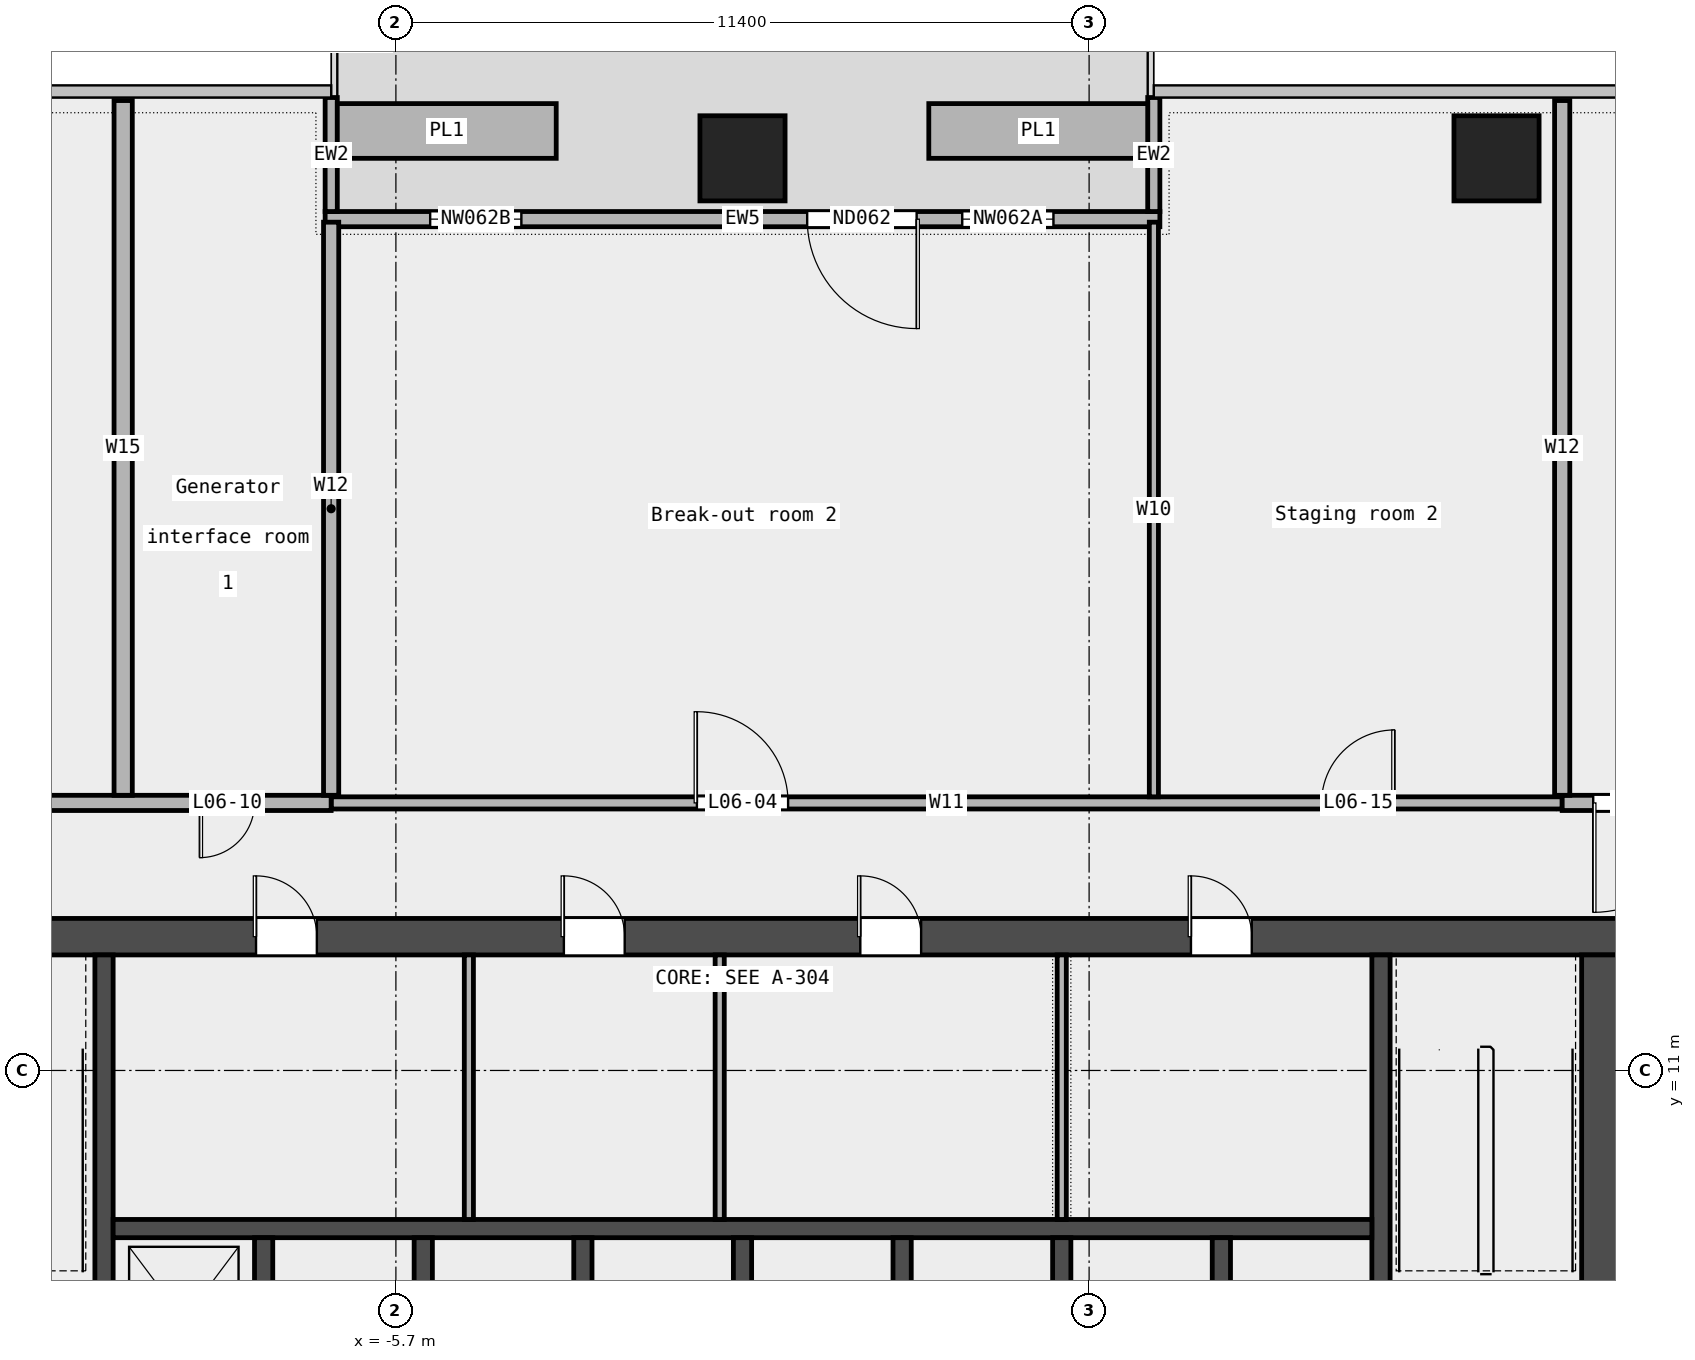
"""IFC4 building model, lengths in metres.
Left out: names, types, materials, properties, quantities, classifications, styles, units other than length and angle.
Written with IfcOpenShell. Run it as: python <this file> out.ifc"""

import sys

from ifc_helpers import new_model, si_unit, direction, frame, frame_2d, origin, origin_2d, place, context, subcontext, project, spatial, rectangle, extrude, element, fill, save


model = new_model("IFC4")
c1 = context("Model", 3, precision=1e-05, world=origin(), true_north=direction((0.0, 1.0)))
c2 = subcontext(c1, "Body", "Model", "MODEL_VIEW")
j1 = project(units=[si_unit("LENGTHUNIT", "METRE"), si_unit("PLANEANGLEUNIT", "RADIAN")], contexts=[c1])
p1 = place(None, origin())
s1 = spatial("IfcSite", under=j1, at=p1, CompositionType="ELEMENT")
p2 = place(p1, origin())
s2 = spatial("IfcBuilding", under=s1, at=p2, CompositionType="ELEMENT")
p3 = place(p2, frame((0.0, 0.0, 35.8)))
s3 = spatial("IfcBuildingStorey", under=s2, at=p3, CompositionType="ELEMENT", Elevation=35.8)
for number, where, z_axis, x_axis in (
    (1, (12.4, 26.0, 0.0), (0.0, 0.0, 1.0), (1.0, 0.0, 0.0)),
    (2, (0.0, 26.0, 0.0), (0.0, 0.0, 1.0), (1.0, 0.0, 0.0)),
):
    element("IfcColumn", number, at=place(p3, frame(where, z_axis=z_axis, x_axis=x_axis)), inside=s3, PredefinedType="COLUMN", context=c2, shape_type="SweptSolid", body=[
        extrude(rectangle(XDim=1.4, YDim=1.4, at=origin_2d()), origin(), (0.0, 0.0, 1.0), 4.35),
    ])
p4 = place(p3, frame((6.864, 25.0, 0.0), z_axis=(0.0, 0.0, 1.0), x_axis=(-1.0, 0.0, 0.0)))
e3 = element("IfcWall", 3, at=p4, inside=s3, PredefinedType="STANDARD", context=c2, shape_type="SweptSolid", body=[
    extrude(rectangle(XDim=13.727, YDim=0.25, at=frame_2d((6.864, 0.0))), origin(), (0.0, 0.0, 1.0), 4.35),
])
p5 = place(p4, frame((1.75, 0.0, 0.45)))
e4 = element("IfcOpeningElement", 4, at=p5, cuts=e3, PredefinedType="OPENING", context=c2, shape_type="SweptSolid", body=[
    extrude(rectangle(XDim=1.5, YDim=3.0, at=frame_2d((0.75, 1.5))), frame((0.0, 0.137, 0.0), z_axis=(0.0, -1.0, 0.0), x_axis=(1.0, 0.0, 0.0)), (0.0, 0.0, 1.0), 0.274),
])
p6 = place(p4, frame((4.0, 0.0, 0.0)))
e5 = element("IfcOpeningElement", 5, at=p6, cuts=e3, PredefinedType="OPENING", context=c2, shape_type="SweptSolid", body=[
    extrude(rectangle(XDim=1.8, YDim=2.4, at=frame_2d((0.9, 1.2))), frame((0.0, 0.137, 0.0), z_axis=(0.0, -1.0, 0.0), x_axis=(1.0, 0.0, 0.0)), (0.0, 0.0, 1.0), 0.274),
])
p7 = place(p4, frame((10.5, 0.0, 0.45)))
e6 = element("IfcOpeningElement", 6, at=p7, cuts=e3, PredefinedType="OPENING", context=c2, shape_type="SweptSolid", body=[
    extrude(rectangle(XDim=1.5, YDim=3.0, at=frame_2d((0.75, 1.5))), frame((0.0, 0.137, 0.0), z_axis=(0.0, -1.0, 0.0), x_axis=(1.0, 0.0, 0.0)), (0.0, 0.0, 1.0), 0.274),
])
for number, where, z_axis, x_axis in (
    (7, (6.764, 27.0, 0.0), (0.0, 0.0, 1.0), (0.0, -1.0, 0.0)),
    (8, (-6.764, 27.0, 0.0), (0.0, 0.0, 1.0), (0.0, -1.0, 0.0)),
):
    element("IfcWall", number, at=place(p3, frame(where, z_axis=z_axis, x_axis=x_axis)), inside=s3, PredefinedType="STANDARD", context=c2, shape_type="SweptSolid", body=[
        extrude(rectangle(XDim=1.875, YDim=0.2, at=frame_2d((0.938, 0.0))), origin(), (0.0, 0.0, 1.0), 4.35),
    ])
for number, where, z_axis, x_axis in (
    (9, (6.664, 26.45, 0.0), (0.0, 0.0, 1.0), (-1.0, 0.0, 0.0)),
    (10, (-3.064, 26.45, 0.0), (0.0, 0.0, 1.0), (-1.0, 0.0, 0.0)),
):
    element("IfcWall", number, at=place(p3, frame(where, z_axis=z_axis, x_axis=x_axis)), inside=s3, PredefinedType="STANDARD", context=c2, shape_type="SweptSolid", body=[
        extrude(rectangle(XDim=3.6, YDim=0.9, at=frame_2d((1.8, 0.0))), origin(), (0.0, 0.0, 1.0), 0.7),
    ])
p8 = place(p3, frame((-6.765, 15.4, 0.0), z_axis=(0.0, 0.0, 1.0), x_axis=(1.0, 0.0, 0.0)))
e11 = element("IfcWall", 11, at=p8, inside=s3, PredefinedType="PARTITIONING", context=c2, shape_type="SweptSolid", body=[
    extrude(rectangle(XDim=20.245, YDim=0.2, at=frame_2d((10.123, 0.0))), origin(), (0.0, 0.0, 1.0), 4.35),
])
p9 = place(p8, frame((6.015, 0.0, 0.0)))
e12 = element("IfcOpeningElement", 12, at=p9, cuts=e11, PredefinedType="OPENING", context=c2, shape_type="SweptSolid", body=[
    extrude(rectangle(XDim=1.5, YDim=2.1, at=frame_2d((0.75, 1.05))), frame((0.0, 0.112, 0.0), z_axis=(0.0, -1.0, 0.0), x_axis=(1.0, 0.0, 0.0)), (0.0, 0.0, 1.0), 0.224),
])
p10 = place(p8, frame((16.288, 0.0, 0.0)))
e13 = element("IfcOpeningElement", 13, at=p10, cuts=e11, PredefinedType="OPENING", context=c2, shape_type="SweptSolid", body=[
    extrude(rectangle(XDim=1.2, YDim=2.1, at=frame_2d((0.6, 1.05))), frame((0.0, 0.112, 0.0), z_axis=(0.0, -1.0, 0.0), x_axis=(1.0, 0.0, 0.0)), (0.0, 0.0, 1.0), 0.224),
])
p11 = place(p3, frame((-21.7, 15.4, 0.0), z_axis=(0.0, 0.0, 1.0), x_axis=(1.0, 0.0, 0.0)))
e14 = element("IfcWall", 14, at=p11, inside=s3, PredefinedType="PARTITIONING", context=c2, shape_type="SweptSolid", body=[
    extrude(rectangle(XDim=14.935, YDim=0.25, at=frame_2d((7.468, 0.0))), origin(), (0.0, 0.0, 1.0), 4.35),
])
p12 = place(p11, frame((12.775, 0.0, 0.0)))
e15 = element("IfcOpeningElement", 15, at=p12, cuts=e14, PredefinedType="OPENING", context=c2, shape_type="SweptSolid", body=[
    extrude(rectangle(XDim=0.9, YDim=2.1, at=frame_2d((0.45, 1.05))), frame((0.0, 0.137, 0.0), z_axis=(0.0, -1.0, 0.0), x_axis=(1.0, 0.0, 0.0)), (0.0, 0.0, 1.0), 0.274),
])
p13 = place(p11, frame((7.558, 0.0, 0.0)))
e16 = element("IfcOpeningElement", 16, at=p13, cuts=e14, PredefinedType="OPENING", context=c2, shape_type="SweptSolid", body=[
    extrude(rectangle(XDim=1.8, YDim=2.1, at=frame_2d((0.9, 1.05))), frame((0.0, 0.137, 0.0), z_axis=(0.0, -1.0, 0.0), x_axis=(1.0, 0.0, 0.0)), (0.0, 0.0, 1.0), 0.274),
])
p14 = place(p3, frame((13.48, 15.4, 0.0), z_axis=(0.0, 0.0, 1.0), x_axis=(1.0, 0.0, 0.0)))
e17 = element("IfcWall", 17, at=p14, inside=s3, PredefinedType="PARTITIONING", context=c2, shape_type="SweptSolid", body=[
    extrude(rectangle(XDim=2.82, YDim=0.25, at=frame_2d((1.41, 0.0))), origin(), (0.0, 0.0, 1.0), 4.35),
])
p15 = place(p14, frame((0.51, 0.0, 0.0)))
e18 = element("IfcOpeningElement", 18, at=p15, cuts=e17, PredefinedType="OPENING", context=c2, shape_type="SweptSolid", body=[
    extrude(rectangle(XDim=1.8, YDim=2.1, at=frame_2d((0.9, 1.05))), frame((0.0, 0.137, 0.0), z_axis=(0.0, -1.0, 0.0), x_axis=(1.0, 0.0, 0.0)), (0.0, 0.0, 1.0), 0.274),
])
p16 = place(p3, frame((-10.185, 15.525, 0.0), z_axis=(0.0, 0.0, 1.0), x_axis=(0.0, 1.0, 0.0)))
e19 = element("IfcWall", 19, at=p16, inside=s3, PredefinedType="PARTITIONING", context=c2, shape_type="SweptSolid", body=[
    extrude(rectangle(XDim=11.425, YDim=0.3, at=frame_2d((5.712, 0.0))), origin(), (0.0, 0.0, 1.0), 4.35),
])
p17 = place(p3, frame((-6.765, 15.525, 0.0), z_axis=(0.0, 0.0, 1.0), x_axis=(0.0, 1.0, 0.0)))
e20 = element("IfcWall", 20, at=p17, inside=s3, PredefinedType="PARTITIONING", context=c2, shape_type="SweptSolid", body=[
    extrude(rectangle(XDim=9.425, YDim=0.25, at=frame_2d((4.712, 0.0))), origin(), (0.0, 0.0, 1.0), 4.35),
])
p18 = place(p3, frame((6.765, 15.5, 0.0), z_axis=(0.0, 0.0, 1.0), x_axis=(0.0, 1.0, 0.0)))
e21 = element("IfcWall", 21, at=p18, inside=s3, PredefinedType="PARTITIONING", context=c2, shape_type="SweptSolid", body=[
    extrude(rectangle(XDim=9.45, YDim=0.15, at=frame_2d((4.725, 0.0))), origin(), (0.0, 0.0, 1.0), 4.35),
])
p19 = place(p3, frame((13.48, 15.525, 0.0), z_axis=(0.0, 0.0, 1.0), x_axis=(0.0, 1.0, 0.0)))
e22 = element("IfcWall", 22, at=p19, inside=s3, PredefinedType="PARTITIONING", context=c2, shape_type="SweptSolid", body=[
    extrude(rectangle(XDim=11.425, YDim=0.25, at=frame_2d((5.712, 0.0))), origin(), (0.0, 0.0, 1.0), 4.35),
])
p20 = place(p3, frame((-14.4, 13.2, 0.0), z_axis=(0.0, 0.0, 1.0), x_axis=(1.0, 0.0, 0.0)))
e23 = element("IfcWall", 23, at=p20, inside=s3, PredefinedType="SHEAR", context=c2, shape_type="SweptSolid", body=[
    extrude(rectangle(XDim=28.8, YDim=0.6, at=frame_2d((14.4, 0.0))), origin(), (0.0, 0.0, 1.0), 4.5),
])
p21 = place(p20, frame((6.4, 0.0, 0.0)))
e24 = element("IfcOpeningElement", 24, at=p21, cuts=e23, PredefinedType="OPENING", context=c2, shape_type="SweptSolid", body=[
    extrude(rectangle(XDim=1.0, YDim=2.1, at=frame_2d((0.5, 1.05))), frame((0.0, 0.312, 0.0), z_axis=(0.0, -1.0, 0.0), x_axis=(1.0, 0.0, 0.0)), (0.0, 0.0, 1.0), 0.624),
])
p22 = place(p20, frame((11.462, 0.0, 0.0)))
e25 = element("IfcOpeningElement", 25, at=p22, cuts=e23, PredefinedType="OPENING", context=c2, shape_type="SweptSolid", body=[
    extrude(rectangle(XDim=1.0, YDim=2.1, at=frame_2d((0.5, 1.05))), frame((0.0, 0.312, 0.0), z_axis=(0.0, -1.0, 0.0), x_axis=(1.0, 0.0, 0.0)), (0.0, 0.0, 1.0), 0.624),
])
p23 = place(p20, frame((16.337, 0.0, 0.0)))
e26 = element("IfcOpeningElement", 26, at=p23, cuts=e23, PredefinedType="OPENING", context=c2, shape_type="SweptSolid", body=[
    extrude(rectangle(XDim=1.0, YDim=2.1, at=frame_2d((0.5, 1.05))), frame((0.0, 0.312, 0.0), z_axis=(0.0, -1.0, 0.0), x_axis=(1.0, 0.0, 0.0)), (0.0, 0.0, 1.0), 0.624),
])
p24 = place(p20, frame((21.775, 0.0, 0.0)))
e27 = element("IfcOpeningElement", 27, at=p24, cuts=e23, PredefinedType="OPENING", context=c2, shape_type="SweptSolid", body=[
    extrude(rectangle(XDim=1.0, YDim=2.1, at=frame_2d((0.5, 1.05))), frame((0.0, 0.312, 0.0), z_axis=(0.0, -1.0, 0.0), x_axis=(1.0, 0.0, 0.0)), (0.0, 0.0, 1.0), 0.624),
])
p25 = place(p3, frame((14.1, -6.6, 0.0), z_axis=(0.0, 0.0, 1.0), x_axis=(0.0, 1.0, 0.0)))
e28 = element("IfcWall", 28, at=p25, inside=s3, PredefinedType="SHEAR", context=c2, shape_type="SweptSolid", body=[
    extrude(rectangle(XDim=19.5, YDim=0.6, at=frame_2d((9.75, 0.0))), origin(), (0.0, 0.0, 1.0), 4.5),
])
p26 = place(p25, frame((9.3, 0.0, 0.0)))
e29 = element("IfcOpeningElement", 29, at=p26, cuts=e28, PredefinedType="OPENING", context=c2, shape_type="SweptSolid", body=[
    extrude(rectangle(XDim=1.8, YDim=2.1, at=frame_2d((0.9, 1.05))), frame((0.0, 0.312, 0.0), z_axis=(0.0, -1.0, 0.0), x_axis=(1.0, 0.0, 0.0)), (0.0, 0.0, 1.0), 0.624),
])
for number, where, z_axis, x_axis in (
    (30, (-10.5, 5.25, 0.0), (0.0, 0.0, 1.0), (0.0, 1.0, 0.0)),
    (31, (10.5, 5.25, 0.0), (0.0, 0.0, 1.0), (0.0, 1.0, 0.0)),
):
    element("IfcWall", number, at=place(p3, frame(where, z_axis=z_axis, x_axis=x_axis)), inside=s3, PredefinedType="SHEAR", context=c2, shape_type="SweptSolid", body=[
        extrude(rectangle(XDim=7.65, YDim=0.3, at=frame_2d((3.825, 0.0))), origin(), (0.0, 0.0, 1.0), 4.5),
    ])
p27 = place(p3, frame((-10.35, 8.4, 0.0), z_axis=(0.0, 0.0, 1.0), x_axis=(1.0, 0.0, 0.0)))
e32 = element("IfcWall", 32, at=p27, inside=s3, PredefinedType="SOLIDWALL", context=c2, shape_type="SweptSolid", body=[
    extrude(rectangle(XDim=20.7, YDim=0.3, at=frame_2d((10.35, 0.0))), origin(), (0.0, 0.0, 1.0), 4.5),
])
for number, where, z_axis, x_axis in (
    (33, (-7.875, 5.55, 0.0), (0.0, 0.0, 1.0), (0.0, 1.0, 0.0)),
    (34, (-5.25, 5.55, 0.0), (0.0, 0.0, 1.0), (0.0, 1.0, 0.0)),
    (35, (-2.625, 5.55, 0.0), (0.0, 0.0, 1.0), (0.0, 1.0, 0.0)),
    (36, (0.0, 5.55, 0.0), (0.0, 0.0, 1.0), (0.0, 1.0, 0.0)),
    (37, (2.625, 5.55, 0.0), (0.0, 0.0, 1.0), (0.0, 1.0, 0.0)),
    (38, (5.25, 5.55, 0.0), (0.0, 0.0, 1.0), (0.0, 1.0, 0.0)),
    (39, (7.875, 5.55, 0.0), (0.0, 0.0, 1.0), (0.0, 1.0, 0.0)),
):
    element("IfcWall", number, at=place(p3, frame(where, z_axis=z_axis, x_axis=x_axis)), inside=s3, PredefinedType="SOLIDWALL", context=c2, shape_type="SweptSolid", body=[
        extrude(rectangle(XDim=2.7, YDim=0.3, at=frame_2d((1.35, 0.0))), origin(), (0.0, 0.0, 1.0), 4.5),
    ])
for number, where, z_axis, x_axis in (
    (40, (-4.5, 8.55, 0.0), (0.0, 0.0, 1.0), (0.0, 1.0, 0.0)),
    (41, (-0.375, 8.55, 0.0), (0.0, 0.0, 1.0), (0.0, 1.0, 0.0)),
    (42, (5.25, 8.55, 0.0), (0.0, 0.0, 1.0), (0.0, 1.0, 0.0)),
):
    element("IfcWall", number, at=place(p3, frame(where, z_axis=z_axis, x_axis=x_axis)), inside=s3, PredefinedType="PARTITIONING", context=c2, shape_type="SweptSolid", body=[
        extrude(rectangle(XDim=4.35, YDim=0.15, at=frame_2d((2.175, 0.0))), origin(), (0.0, 0.0, 1.0), 4.5),
    ])
p28 = place(p5, origin())
e43 = element("IfcWindow", 43, at=p28, inside=s3, PartitioningType="SINGLE_PANEL", PredefinedType="WINDOW", context=c2, shape_type="SweptSolid", body=[
    extrude(rectangle(XDim=1.5, YDim=3.0, at=frame_2d((0.75, 1.5))), frame((0.0, 0.03, 0.0), z_axis=(0.0, -1.0, 0.0), x_axis=(1.0, 0.0, 0.0)), (0.0, 0.0, 1.0), 0.06),
])
fill(e4, e43)
p29 = place(p6, origin())
e44 = element("IfcDoor", 44, at=p29, inside=s3, OperationType="DOUBLE_DOOR_SINGLE_SWING", PredefinedType="DOOR", context=c2, shape_type="SweptSolid", body=[
    extrude(rectangle(XDim=1.8, YDim=2.4, at=frame_2d((0.9, 1.2))), frame((0.0, 0.025, 0.0), z_axis=(0.0, -1.0, 0.0), x_axis=(1.0, 0.0, 0.0)), (0.0, 0.0, 1.0), 0.05),
])
fill(e5, e44)
p30 = place(p7, origin())
e45 = element("IfcWindow", 45, at=p30, inside=s3, PartitioningType="SINGLE_PANEL", PredefinedType="WINDOW", context=c2, shape_type="SweptSolid", body=[
    extrude(rectangle(XDim=1.5, YDim=3.0, at=frame_2d((0.75, 1.5))), frame((0.0, 0.03, 0.0), z_axis=(0.0, -1.0, 0.0), x_axis=(1.0, 0.0, 0.0)), (0.0, 0.0, 1.0), 0.06),
])
fill(e6, e45)
p31 = place(p9, origin())
e46 = element("IfcDoor", 46, at=p31, inside=s3, OperationType="DOUBLE_DOOR_SINGLE_SWING", PredefinedType="DOOR", context=c2, shape_type="SweptSolid", body=[
    extrude(rectangle(XDim=1.5, YDim=2.1, at=frame_2d((0.75, 1.05))), frame((0.0, 0.025, 0.0), z_axis=(0.0, -1.0, 0.0), x_axis=(1.0, 0.0, 0.0)), (0.0, 0.0, 1.0), 0.05),
])
fill(e12, e46)
p32 = place(p12, origin())
e47 = element("IfcDoor", 47, at=p32, inside=s3, OperationType="SINGLE_SWING_RIGHT", PredefinedType="DOOR", context=c2, shape_type="SweptSolid", body=[
    extrude(rectangle(XDim=0.9, YDim=2.1, at=frame_2d((0.45, 1.05))), frame((0.0, 0.025, 0.0), z_axis=(0.0, -1.0, 0.0), x_axis=(1.0, 0.0, 0.0)), (0.0, 0.0, 1.0), 0.05),
])
fill(e15, e47)
p33 = place(p15, origin())
e48 = element("IfcDoor", 48, at=p33, inside=s3, OperationType="DOUBLE_DOOR_SINGLE_SWING", PredefinedType="DOOR", context=c2, shape_type="SweptSolid", body=[
    extrude(rectangle(XDim=1.8, YDim=2.1, at=frame_2d((0.9, 1.05))), frame((0.0, 0.025, 0.0), z_axis=(0.0, -1.0, 0.0), x_axis=(1.0, 0.0, 0.0)), (0.0, 0.0, 1.0), 0.05),
])
fill(e18, e48)
p34 = place(p10, origin())
e49 = element("IfcDoor", 49, at=p34, inside=s3, OperationType="SINGLE_SWING_RIGHT", PredefinedType="DOOR", context=c2, shape_type="SweptSolid", body=[
    extrude(rectangle(XDim=1.2, YDim=2.1, at=frame_2d((0.6, 1.05))), frame((0.0, 0.025, 0.0), z_axis=(0.0, -1.0, 0.0), x_axis=(1.0, 0.0, 0.0)), (0.0, 0.0, 1.0), 0.05),
])
fill(e13, e49)
p35 = place(p21, origin())
e50 = element("IfcDoor", 50, at=p35, inside=s3, OperationType="SINGLE_SWING_LEFT", PredefinedType="DOOR", context=c2, shape_type="SweptSolid", body=[
    extrude(rectangle(XDim=1.0, YDim=2.1, at=frame_2d((0.5, 1.05))), frame((0.0, 0.025, 0.0), z_axis=(0.0, -1.0, 0.0), x_axis=(1.0, 0.0, 0.0)), (0.0, 0.0, 1.0), 0.05),
])
fill(e24, e50)
p36 = place(p22, origin())
e51 = element("IfcDoor", 51, at=p36, inside=s3, OperationType="SINGLE_SWING_LEFT", PredefinedType="DOOR", context=c2, shape_type="SweptSolid", body=[
    extrude(rectangle(XDim=1.0, YDim=2.1, at=frame_2d((0.5, 1.05))), frame((0.0, 0.025, 0.0), z_axis=(0.0, -1.0, 0.0), x_axis=(1.0, 0.0, 0.0)), (0.0, 0.0, 1.0), 0.05),
])
fill(e25, e51)
p37 = place(p23, origin())
e52 = element("IfcDoor", 52, at=p37, inside=s3, OperationType="SINGLE_SWING_LEFT", PredefinedType="DOOR", context=c2, shape_type="SweptSolid", body=[
    extrude(rectangle(XDim=1.0, YDim=2.1, at=frame_2d((0.5, 1.05))), frame((0.0, 0.025, 0.0), z_axis=(0.0, -1.0, 0.0), x_axis=(1.0, 0.0, 0.0)), (0.0, 0.0, 1.0), 0.05),
])
fill(e26, e52)
p38 = place(p24, origin())
e53 = element("IfcDoor", 53, at=p38, inside=s3, OperationType="SINGLE_SWING_LEFT", PredefinedType="DOOR", context=c2, shape_type="SweptSolid", body=[
    extrude(rectangle(XDim=1.0, YDim=2.1, at=frame_2d((0.5, 1.05))), frame((0.0, 0.025, 0.0), z_axis=(0.0, -1.0, 0.0), x_axis=(1.0, 0.0, 0.0)), (0.0, 0.0, 1.0), 0.05),
])
fill(e27, e53)
save(model, sys.argv[1])
